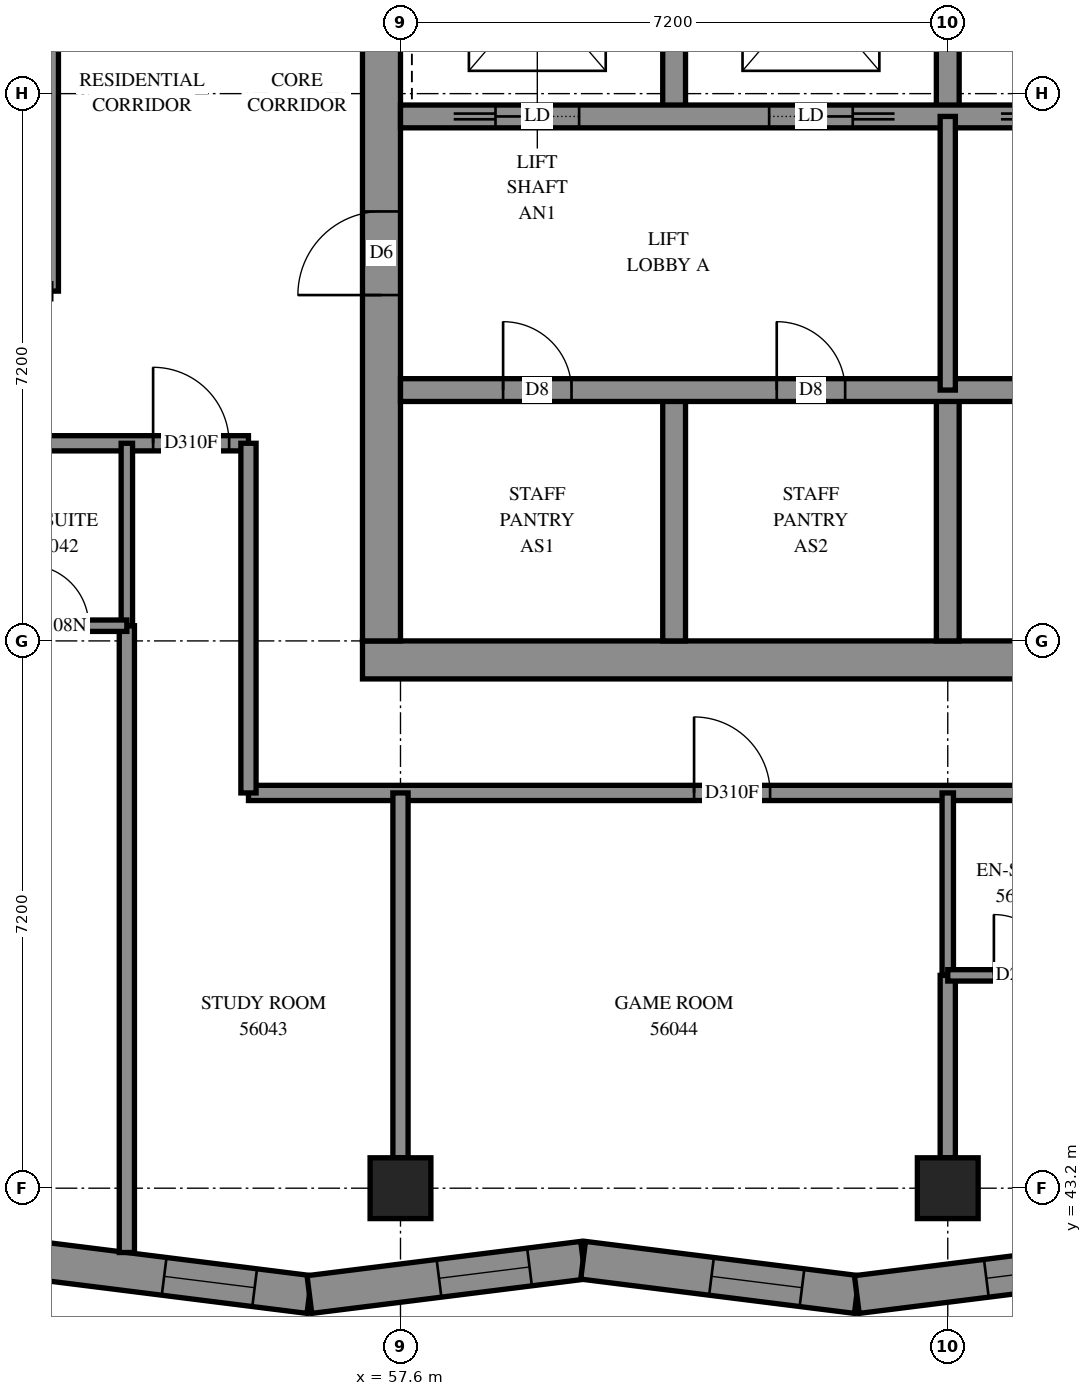
"""IFC4 building model, lengths in metres.
Left out: names, types, materials, properties, quantities, classifications, styles, units other than length and angle.
Written with IfcOpenShell. Run it as: python <this file> out.ifc"""

import sys

from ifc_helpers import new_model, si_unit, direction, frame, frame_2d, origin, origin_2d, place, context, subcontext, project, spatial, polyline, rectangle, outline, extrude, element, fill, save


model = new_model("IFC4")
c1 = context("Model", 3, precision=1e-05, world=origin(), true_north=direction((0.0, 1.0)))
c2 = subcontext(c1, "Body", "Model", "MODEL_VIEW")
j1 = project(units=[si_unit("LENGTHUNIT", "METRE"), si_unit("PLANEANGLEUNIT", "RADIAN")], contexts=[c1])
p1 = place(None, origin())
s1 = spatial("IfcSite", under=j1, at=p1, CompositionType="ELEMENT")
p2 = place(p1, origin())
s2 = spatial("IfcBuilding", under=s1, at=p2, CompositionType="ELEMENT")
p3 = place(p2, frame((0.0, 0.0, 206.6)))
s3 = spatial("IfcBuildingStorey", under=s2, at=p3, CompositionType="ELEMENT", Elevation=206.6)
for number, where, z_axis, x_axis in (
    (1, (57.6, 43.2, 0.0), (0.0, 0.0, 1.0), (1.0, 0.0, 0.0)),
    (2, (64.8, 43.2, 0.0), (0.0, 0.0, 1.0), (1.0, 0.0, 0.0)),
):
    element("IfcColumn", number, at=place(p3, frame(where, z_axis=z_axis, x_axis=x_axis)), inside=s3, PredefinedType="COLUMN", context=c2, shape_type="SweptSolid", body=[
        extrude(rectangle(XDim=0.8, YDim=0.8, at=origin_2d()), origin(), (0.0, 0.0, 1.0), 3.1),
    ])
p4 = place(p3, frame((57.1, 50.15, -0.3), z_axis=(0.0, 0.0, 1.0), x_axis=(1.0, 0.0, 0.0)))
e3 = element("IfcWall", 3, at=p4, inside=s3, PredefinedType="SHEAR", context=c2, shape_type="SweptSolid", body=[
    extrude(rectangle(XDim=15.4, YDim=0.5, at=frame_2d((7.7, 0.0))), origin(), (0.0, 0.0, 1.0), 2.7),
])
p5 = place(p3, frame((57.35, 50.4, -0.3), z_axis=(0.0, 0.0, 1.0), x_axis=(0.0, 1.0, 0.0)))
e4 = element("IfcWall", 4, at=p5, inside=s3, PredefinedType="SHEAR", context=c2, shape_type="SweptSolid", body=[
    extrude(rectangle(XDim=14.4, YDim=0.5, at=frame_2d((7.2, 0.0))), origin(), (0.0, 0.0, 1.0), 2.7),
])
p6 = place(p5, frame((4.55, 0.0, 0.3)))
e5 = element("IfcOpeningElement", 5, at=p6, cuts=e4, PredefinedType="OPENING", context=c2, shape_type="SweptSolid", body=[
    extrude(rectangle(XDim=1.1, YDim=2.1, at=frame_2d((0.55, 1.05))), frame((0.0, 0.26, 0.0), z_axis=(0.0, -1.0, 0.0), x_axis=(1.0, 0.0, 0.0)), (0.0, 0.0, 1.0), 0.52),
])
p7 = place(p5, frame((11.35, 0.0, 0.3)))
e6 = element("IfcOpeningElement", 6, at=p7, cuts=e4, PredefinedType="OPENING", context=c2, shape_type="SweptSolid", body=[
    extrude(rectangle(XDim=1.1, YDim=2.1, at=frame_2d((0.55, 1.05))), frame((0.0, 0.26, 0.0), z_axis=(0.0, -1.0, 0.0), x_axis=(1.0, 0.0, 0.0)), (0.0, 0.0, 1.0), 0.52),
])
for number, where, z_axis, x_axis in (
    (7, (61.2, 50.4, 0.0), (0.0, 0.0, 1.0), (0.0, 1.0, 0.0)),
    (8, (61.2, 57.3, 0.0), (0.0, 0.0, 1.0), (0.0, 1.0, 0.0)),
    (9, (64.8, 50.4, 0.0), (0.0, 0.0, 1.0), (0.0, 1.0, 0.0)),
    (10, (64.8, 57.3, 0.0), (0.0, 0.0, 1.0), (0.0, 1.0, 0.0)),
):
    element("IfcWall", number, at=place(p3, frame(where, z_axis=z_axis, x_axis=x_axis)), inside=s3, PredefinedType="SOLIDWALL", context=c2, shape_type="SweptSolid", body=[
        extrude(rectangle(XDim=3.3, YDim=0.3, at=frame_2d((1.65, 0.0))), origin(), (0.0, 0.0, 1.0), 3.1),
    ])
p8 = place(p3, frame((57.6, 53.7, 0.0), z_axis=(0.0, 0.0, 1.0), x_axis=(1.0, 0.0, 0.0)))
e11 = element("IfcWall", 11, at=p8, inside=s3, PredefinedType="SOLIDWALL", context=c2, shape_type="SweptSolid", body=[
    extrude(rectangle(XDim=14.4, YDim=0.3, at=frame_2d((7.2, 0.0))), origin(), (0.0, 0.0, 1.0), 3.1),
])
p9 = place(p8, frame((1.35, 0.0, 0.0)))
e12 = element("IfcOpeningElement", 12, at=p9, cuts=e11, PredefinedType="OPENING", context=c2, shape_type="SweptSolid", body=[
    extrude(rectangle(XDim=0.9, YDim=2.1, at=frame_2d((0.45, 1.05))), frame((0.0, 0.16, 0.0), z_axis=(0.0, -1.0, 0.0), x_axis=(1.0, 0.0, 0.0)), (0.0, 0.0, 1.0), 0.32),
])
p10 = place(p8, frame((4.95, 0.0, 0.0)))
e13 = element("IfcOpeningElement", 13, at=p10, cuts=e11, PredefinedType="OPENING", context=c2, shape_type="SweptSolid", body=[
    extrude(rectangle(XDim=0.9, YDim=2.1, at=frame_2d((0.45, 1.05))), frame((0.0, 0.16, 0.0), z_axis=(0.0, -1.0, 0.0), x_axis=(1.0, 0.0, 0.0)), (0.0, 0.0, 1.0), 0.32),
])
p11 = place(p8, frame((8.55, 0.0, 0.0)))
e14 = element("IfcOpeningElement", 14, at=p11, cuts=e11, PredefinedType="OPENING", context=c2, shape_type="SweptSolid", body=[
    extrude(rectangle(XDim=0.9, YDim=2.1, at=frame_2d((0.45, 1.05))), frame((0.0, 0.16, 0.0), z_axis=(0.0, -1.0, 0.0), x_axis=(1.0, 0.0, 0.0)), (0.0, 0.0, 1.0), 0.32),
])
p12 = place(p8, frame((12.05, 0.0, 0.0)))
e15 = element("IfcOpeningElement", 15, at=p12, cuts=e11, PredefinedType="OPENING", context=c2, shape_type="SweptSolid", body=[
    extrude(rectangle(XDim=1.1, YDim=2.1, at=frame_2d((0.55, 1.05))), frame((0.0, 0.16, 0.0), z_axis=(0.0, -1.0, 0.0), x_axis=(1.0, 0.0, 0.0)), (0.0, 0.0, 1.0), 0.32),
])
p13 = place(p3, frame((57.6, 57.3, 0.0), z_axis=(0.0, 0.0, 1.0), x_axis=(1.0, 0.0, 0.0)))
e16 = element("IfcWall", 16, at=p13, inside=s3, PredefinedType="SOLIDWALL", context=c2, shape_type="SweptSolid", body=[
    extrude(rectangle(XDim=14.4, YDim=0.3, at=frame_2d((7.2, 0.0))), origin(), (0.0, 0.0, 1.0), 3.1),
])
p14 = place(p13, frame((1.25, 0.0, 0.0)))
e17 = element("IfcOpeningElement", 17, at=p14, cuts=e16, PredefinedType="OPENING", context=c2, shape_type="SweptSolid", body=[
    extrude(rectangle(XDim=1.1, YDim=2.1, at=frame_2d((0.55, 1.05))), frame((0.0, 0.16, 0.0), z_axis=(0.0, -1.0, 0.0), x_axis=(1.0, 0.0, 0.0)), (0.0, 0.0, 1.0), 0.32),
])
p15 = place(p13, frame((4.85, 0.0, 0.0)))
e18 = element("IfcOpeningElement", 18, at=p15, cuts=e16, PredefinedType="OPENING", context=c2, shape_type="SweptSolid", body=[
    extrude(rectangle(XDim=1.1, YDim=2.1, at=frame_2d((0.55, 1.05))), frame((0.0, 0.16, 0.0), z_axis=(0.0, -1.0, 0.0), x_axis=(1.0, 0.0, 0.0)), (0.0, 0.0, 1.0), 0.32),
])
p16 = place(p13, frame((8.45, 0.0, 0.0)))
e19 = element("IfcOpeningElement", 19, at=p16, cuts=e16, PredefinedType="OPENING", context=c2, shape_type="SweptSolid", body=[
    extrude(rectangle(XDim=1.1, YDim=2.1, at=frame_2d((0.55, 1.05))), frame((0.0, 0.16, 0.0), z_axis=(0.0, -1.0, 0.0), x_axis=(1.0, 0.0, 0.0)), (0.0, 0.0, 1.0), 0.32),
])
p17 = place(p13, frame((12.05, 0.0, 0.0)))
e20 = element("IfcOpeningElement", 20, at=p17, cuts=e16, PredefinedType="OPENING", context=c2, shape_type="SweptSolid", body=[
    extrude(rectangle(XDim=1.1, YDim=2.1, at=frame_2d((0.55, 1.05))), frame((0.0, 0.16, 0.0), z_axis=(0.0, -1.0, 0.0), x_axis=(1.0, 0.0, 0.0)), (0.0, 0.0, 1.0), 0.32),
])
p18 = place(p3, frame((52.781, 42.255, 0.0), z_axis=(0.0, 0.0, 1.0), x_axis=(0.9922491844, -0.1242640575, 0.0)))
e21 = element("IfcWall", 21, at=p18, inside=s3, PredefinedType="SOLIDWALL", context=c2, shape_type="SweptSolid", body=[
    extrude(outline(polyline([(0.052, -0.25), (3.681, -0.25), (3.618, 0.25), (-0.052, 0.25), (0.052, -0.25)])), origin(), (0.0, 0.0, 1.0), 3.1),
])
p19 = place(p18, frame((1.724, 0.0, 0.45)))
e22 = element("IfcOpeningElement", 22, at=p19, cuts=e21, PredefinedType="OPENING", context=c2, shape_type="SweptSolid", body=[
    extrude(rectangle(XDim=1.2, YDim=2.5, at=frame_2d((0.6, 1.25))), frame((0.0, 0.26, 0.0), z_axis=(0.0, -1.0, 0.0), x_axis=(1.0, 0.0, 0.0)), (0.0, 0.0, 1.0), 0.52),
])
p20 = place(p3, frame((56.402, 41.801, 0.0), z_axis=(0.0, 0.0, 1.0), x_axis=(0.9922477484, 0.124275524, 0.0)))
e23 = element("IfcWall", 23, at=p20, inside=s3, PredefinedType="SOLIDWALL", context=c2, shape_type="SweptSolid", body=[
    extrude(outline(polyline([(-0.031, -0.25), (3.598, -0.25), (3.66, 0.25), (0.031, 0.25), (-0.031, -0.25)])), origin(), (0.0, 0.0, 1.0), 3.1),
])
p21 = place(p20, frame((1.718, 0.0, 0.45)))
e24 = element("IfcOpeningElement", 24, at=p21, cuts=e23, PredefinedType="OPENING", context=c2, shape_type="SweptSolid", body=[
    extrude(rectangle(XDim=1.2, YDim=2.5, at=frame_2d((0.6, 1.25))), frame((0.0, 0.26, 0.0), z_axis=(0.0, -1.0, 0.0), x_axis=(1.0, 0.0, 0.0)), (0.0, 0.0, 1.0), 0.52),
])
p22 = place(p3, frame((60.003, 42.252, 0.0), z_axis=(0.0, 0.0, 1.0), x_axis=(0.9922477484, -0.124275524, 0.0)))
e25 = element("IfcWall", 25, at=p22, inside=s3, PredefinedType="SOLIDWALL", context=c2, shape_type="SweptSolid", body=[
    extrude(outline(polyline([(0.031, -0.25), (3.66, -0.25), (3.598, 0.25), (-0.031, 0.25), (0.031, -0.25)])), origin(), (0.0, 0.0, 1.0), 3.1),
])
p23 = place(p22, frame((1.702, 0.0, 0.45)))
e26 = element("IfcOpeningElement", 26, at=p23, cuts=e25, PredefinedType="OPENING", context=c2, shape_type="SweptSolid", body=[
    extrude(rectangle(XDim=1.2, YDim=2.5, at=frame_2d((0.6, 1.25))), frame((0.0, 0.26, 0.0), z_axis=(0.0, -1.0, 0.0), x_axis=(1.0, 0.0, 0.0)), (0.0, 0.0, 1.0), 0.52),
])
p24 = place(p3, frame((63.603, 41.801, 0.0), z_axis=(0.0, 0.0, 1.0), x_axis=(0.9922473228, 0.1242789221, 0.0)))
e27 = element("IfcWall", 27, at=p24, inside=s3, PredefinedType="SOLIDWALL", context=c2, shape_type="SweptSolid", body=[
    extrude(outline(polyline([(-0.031, -0.25), (3.598, -0.25), (3.66, 0.25), (0.031, 0.25), (-0.031, -0.25)])), origin(), (0.0, 0.0, 1.0), 3.1),
])
p25 = place(p24, frame((1.717, 0.0, 0.45)))
e28 = element("IfcOpeningElement", 28, at=p25, cuts=e27, PredefinedType="OPENING", context=c2, shape_type="SweptSolid", body=[
    extrude(rectangle(XDim=1.2, YDim=2.5, at=frame_2d((0.6, 1.25))), frame((0.0, 0.26, 0.0), z_axis=(0.0, -1.0, 0.0), x_axis=(1.0, 0.0, 0.0)), (0.0, 0.0, 1.0), 0.52),
])
p26 = place(p3, frame((64.8, 53.7, 0.0), z_axis=(0.0, 0.0, 1.0), x_axis=(0.0, 1.0, 0.0)))
e29 = element("IfcWall", 29, at=p26, inside=s3, PredefinedType="PARTITIONING", context=c2, shape_type="SweptSolid", body=[
    extrude(rectangle(XDim=3.6, YDim=0.2, at=frame_2d((1.8, 0.0))), origin(), (0.0, 0.0, 1.0), 3.1),
])
p27 = place(p3, frame((55.6, 48.4, 0.0), z_axis=(0.0, 0.0, 1.0), x_axis=(1.0, 0.0, 0.0)))
e30 = element("IfcWall", 30, at=p27, inside=s3, PredefinedType="PARTITIONING", context=c2, shape_type="SweptSolid", body=[
    extrude(rectangle(XDim=18.4, YDim=0.2, at=frame_2d((9.2, 0.0))), origin(), (0.0, 0.0, 1.0), 3.1),
])
p28 = place(p27, frame((5.862, 0.0, 0.0)))
e31 = element("IfcOpeningElement", 31, at=p28, cuts=e30, PredefinedType="OPENING", context=c2, shape_type="SweptSolid", body=[
    extrude(rectangle(XDim=1.0, YDim=2.1, at=frame_2d((0.5, 1.05))), frame((0.0, 0.11, 0.0), z_axis=(0.0, -1.0, 0.0), x_axis=(1.0, 0.0, 0.0)), (0.0, 0.0, 1.0), 0.22),
])
p29 = place(p27, frame((13.099, 0.0, 0.0)))
e32 = element("IfcOpeningElement", 32, at=p29, cuts=e30, PredefinedType="OPENING", context=c2, shape_type="SweptSolid", body=[
    extrude(rectangle(XDim=0.9, YDim=2.1, at=frame_2d((0.45, 1.05))), frame((0.0, 0.11, 0.0), z_axis=(0.0, -1.0, 0.0), x_axis=(1.0, 0.0, 0.0)), (0.0, 0.0, 1.0), 0.22),
])
p30 = place(p3, frame((54.0, 42.354, 0.0), z_axis=(0.0, 0.0, 1.0), x_axis=(0.0, 1.0, 0.0)))
e33 = element("IfcWall", 33, at=p30, inside=s3, PredefinedType="PARTITIONING", context=c2, shape_type="SweptSolid", body=[
    extrude(rectangle(XDim=8.246, YDim=0.2, at=frame_2d((4.123, 0.0))), origin(), (0.0, 0.0, 1.0), 3.1),
])
p31 = place(p3, frame((50.4, 53.0, 0.0), z_axis=(0.0, 0.0, 1.0), x_axis=(1.0, 0.0, 0.0)))
e34 = element("IfcWall", 34, at=p31, inside=s3, PredefinedType="PARTITIONING", context=c2, shape_type="SweptSolid", body=[
    extrude(rectangle(XDim=5.2, YDim=0.2, at=frame_2d((2.6, 0.0))), origin(), (0.0, 0.0, 1.0), 3.1),
])
p32 = place(p31, frame((0.4, 0.0, 0.0)))
e35 = element("IfcOpeningElement", 35, at=p32, cuts=e34, PredefinedType="OPENING", context=c2, shape_type="SweptSolid", body=[
    extrude(rectangle(XDim=0.9, YDim=2.1, at=frame_2d((0.45, 1.05))), frame((0.0, 0.11, 0.0), z_axis=(0.0, -1.0, 0.0), x_axis=(1.0, 0.0, 0.0)), (0.0, 0.0, 1.0), 0.22),
])
p33 = place(p31, frame((3.946, 0.0, 0.0)))
e36 = element("IfcOpeningElement", 36, at=p33, cuts=e34, PredefinedType="OPENING", context=c2, shape_type="SweptSolid", body=[
    extrude(rectangle(XDim=1.0, YDim=2.1, at=frame_2d((0.5, 1.05))), frame((0.0, 0.11, 0.0), z_axis=(0.0, -1.0, 0.0), x_axis=(1.0, 0.0, 0.0)), (0.0, 0.0, 1.0), 0.22),
])
p34 = place(p3, frame((53.0, 55.002, 0.0), z_axis=(0.0, 0.0, 1.0), x_axis=(0.0, 1.0, 0.0)))
e37 = element("IfcWall", 37, at=p34, inside=s3, PredefinedType="PARTITIONING", context=c2, shape_type="SweptSolid", body=[
    extrude(rectangle(XDim=5.198, YDim=0.2, at=frame_2d((2.599, 0.0))), origin(), (0.0, 0.0, 1.0), 3.1),
])
p35 = place(p3, frame((57.6, 43.6, 0.0), z_axis=(0.0, 0.0, 1.0), x_axis=(0.0, 1.0, 0.0)))
e38 = element("IfcWall", 38, at=p35, inside=s3, PredefinedType="PARTITIONING", context=c2, shape_type="SweptSolid", body=[
    extrude(rectangle(XDim=4.8, YDim=0.2, at=frame_2d((2.4, 0.0))), origin(), (0.0, 0.0, 1.0), 3.1),
])
p36 = place(p3, frame((55.6, 48.4, 0.0), z_axis=(0.0, 0.0, 1.0), x_axis=(0.0, 1.0, 0.0)))
e39 = element("IfcWall", 39, at=p36, inside=s3, PredefinedType="PARTITIONING", context=c2, shape_type="SweptSolid", body=[
    extrude(rectangle(XDim=4.6, YDim=0.2, at=frame_2d((2.3, 0.0))), origin(), (0.0, 0.0, 1.0), 3.1),
])
p37 = place(p3, frame((54.0, 50.6, 0.0), z_axis=(0.0, 0.0, 1.0), x_axis=(0.0, 1.0, 0.0)))
e40 = element("IfcWall", 40, at=p37, inside=s3, PredefinedType="PARTITIONING", context=c2, shape_type="SweptSolid", body=[
    extrude(rectangle(XDim=2.4, YDim=0.15, at=frame_2d((1.2, 0.0))), origin(), (0.0, 0.0, 1.0), 3.1),
])
p38 = place(p3, frame((64.8, 43.6, 0.0), z_axis=(0.0, 0.0, 1.0), x_axis=(0.0, 1.0, 0.0)))
e41 = element("IfcWall", 41, at=p38, inside=s3, PredefinedType="PARTITIONING", context=c2, shape_type="SweptSolid", body=[
    extrude(rectangle(XDim=2.4, YDim=0.2, at=frame_2d((1.2, 0.0))), origin(), (0.0, 0.0, 1.0), 3.1),
])
p39 = place(p3, frame((64.8, 46.0, 0.0), z_axis=(0.0, 0.0, 1.0), x_axis=(0.0, 1.0, 0.0)))
e42 = element("IfcWall", 42, at=p39, inside=s3, PredefinedType="PARTITIONING", context=c2, shape_type="SweptSolid", body=[
    extrude(rectangle(XDim=2.4, YDim=0.15, at=frame_2d((1.2, 0.0))), origin(), (0.0, 0.0, 1.0), 3.1),
])
p40 = place(p3, frame((64.8, 46.0, 0.0), z_axis=(0.0, 0.0, 1.0), x_axis=(1.0, 0.0, 0.0)))
e43 = element("IfcWall", 43, at=p40, inside=s3, PredefinedType="PARTITIONING", context=c2, shape_type="SweptSolid", body=[
    extrude(rectangle(XDim=1.9, YDim=0.15, at=frame_2d((0.95, 0.0))), origin(), (0.0, 0.0, 1.0), 3.1),
])
p41 = place(p40, frame((0.607, 0.0, 0.0)))
e44 = element("IfcOpeningElement", 44, at=p41, cuts=e43, PredefinedType="OPENING", context=c2, shape_type="SweptSolid", body=[
    extrude(rectangle(XDim=0.8, YDim=2.1, at=frame_2d((0.4, 1.05))), frame((0.0, 0.085, 0.0), z_axis=(0.0, -1.0, 0.0), x_axis=(1.0, 0.0, 0.0)), (0.0, 0.0, 1.0), 0.17),
])
p42 = place(p3, frame((52.1, 50.6, 0.0), z_axis=(0.0, 0.0, 1.0), x_axis=(1.0, 0.0, 0.0)))
e45 = element("IfcWall", 45, at=p42, inside=s3, PredefinedType="PARTITIONING", context=c2, shape_type="SweptSolid", body=[
    extrude(rectangle(XDim=1.9, YDim=0.15, at=frame_2d((0.95, 0.0))), origin(), (0.0, 0.0, 1.0), 3.1),
])
p43 = place(p42, frame((0.598, 0.0, 0.0)))
e46 = element("IfcOpeningElement", 46, at=p43, cuts=e45, PredefinedType="OPENING", context=c2, shape_type="SweptSolid", body=[
    extrude(rectangle(XDim=0.8, YDim=2.1, at=frame_2d((0.4, 1.05))), frame((0.0, 0.085, 0.0), z_axis=(0.0, -1.0, 0.0), x_axis=(1.0, 0.0, 0.0)), (0.0, 0.0, 1.0), 0.17),
])
p44 = place(p19, origin())
e47 = element("IfcWindow", 47, at=p44, inside=s3, PartitioningType="SINGLE_PANEL", PredefinedType="WINDOW", context=c2, shape_type="SweptSolid", body=[
    extrude(rectangle(XDim=1.2, YDim=2.5, at=frame_2d((0.6, 1.25))), frame((0.0, 0.18, 0.0), z_axis=(0.0, -1.0, 0.0), x_axis=(1.0, 0.0, 0.0)), (0.0, 0.0, 1.0), 0.06),
])
fill(e22, e47)
p45 = place(p21, origin())
e48 = element("IfcWindow", 48, at=p45, inside=s3, PartitioningType="SINGLE_PANEL", PredefinedType="WINDOW", context=c2, shape_type="SweptSolid", body=[
    extrude(rectangle(XDim=1.2, YDim=2.5, at=frame_2d((0.6, 1.25))), frame((0.0, 0.18, 0.0), z_axis=(0.0, -1.0, 0.0), x_axis=(1.0, 0.0, 0.0)), (0.0, 0.0, 1.0), 0.06),
])
fill(e24, e48)
p46 = place(p23, origin())
e49 = element("IfcWindow", 49, at=p46, inside=s3, PartitioningType="SINGLE_PANEL", PredefinedType="WINDOW", context=c2, shape_type="SweptSolid", body=[
    extrude(rectangle(XDim=1.2, YDim=2.5, at=frame_2d((0.6, 1.25))), frame((0.0, 0.18, 0.0), z_axis=(0.0, -1.0, 0.0), x_axis=(1.0, 0.0, 0.0)), (0.0, 0.0, 1.0), 0.06),
])
fill(e26, e49)
p47 = place(p25, origin())
e50 = element("IfcWindow", 50, at=p47, inside=s3, PartitioningType="SINGLE_PANEL", PredefinedType="WINDOW", context=c2, shape_type="SweptSolid", body=[
    extrude(rectangle(XDim=1.2, YDim=2.5, at=frame_2d((0.6, 1.25))), frame((0.0, 0.18, 0.0), z_axis=(0.0, -1.0, 0.0), x_axis=(1.0, 0.0, 0.0)), (0.0, 0.0, 1.0), 0.06),
])
fill(e28, e50)
p48 = place(p6, origin())
e51 = element("IfcDoor", 51, at=p48, inside=s3, OperationType="DOUBLE_DOOR_SINGLE_SWING", PredefinedType="DOOR", context=c2, shape_type="SweptSolid", body=[
    extrude(rectangle(XDim=1.1, YDim=2.1, at=frame_2d((0.55, 1.05))), frame((0.0, 0.025, 0.0), z_axis=(0.0, -1.0, 0.0), x_axis=(1.0, 0.0, 0.0)), (0.0, 0.0, 1.0), 0.05),
])
fill(e5, e51)
p49 = place(p9, origin())
e52 = element("IfcDoor", 52, at=p49, inside=s3, OperationType="SINGLE_SWING_LEFT", PredefinedType="DOOR", context=c2, shape_type="SweptSolid", body=[
    extrude(rectangle(XDim=0.9, YDim=2.1, at=frame_2d((0.45, 1.05))), frame((0.0, 0.025, 0.0), z_axis=(0.0, -1.0, 0.0), x_axis=(1.0, 0.0, 0.0)), (0.0, 0.0, 1.0), 0.05),
])
fill(e12, e52)
p50 = place(p10, origin())
e53 = element("IfcDoor", 53, at=p50, inside=s3, OperationType="SINGLE_SWING_LEFT", PredefinedType="DOOR", context=c2, shape_type="SweptSolid", body=[
    extrude(rectangle(XDim=0.9, YDim=2.1, at=frame_2d((0.45, 1.05))), frame((0.0, 0.025, 0.0), z_axis=(0.0, -1.0, 0.0), x_axis=(1.0, 0.0, 0.0)), (0.0, 0.0, 1.0), 0.05),
])
fill(e13, e53)
p51 = place(p14, origin())
e54 = element("IfcDoor", 54, at=p51, inside=s3, OperationType="SLIDING_TO_LEFT", PredefinedType="DOOR", context=c2, shape_type="SweptSolid", body=[
    extrude(rectangle(XDim=1.1, YDim=2.1, at=frame_2d((0.55, 1.05))), frame((0.0, 0.025, 0.0), z_axis=(0.0, -1.0, 0.0), x_axis=(1.0, 0.0, 0.0)), (0.0, 0.0, 1.0), 0.05),
])
fill(e17, e54)
p52 = place(p15, origin())
e55 = element("IfcDoor", 55, at=p52, inside=s3, OperationType="SLIDING_TO_RIGHT", PredefinedType="DOOR", context=c2, shape_type="SweptSolid", body=[
    extrude(rectangle(XDim=1.1, YDim=2.1, at=frame_2d((0.55, 1.05))), frame((0.0, 0.025, 0.0), z_axis=(0.0, -1.0, 0.0), x_axis=(1.0, 0.0, 0.0)), (0.0, 0.0, 1.0), 0.05),
])
fill(e18, e55)
p53 = place(p43, origin())
e56 = element("IfcDoor", 56, at=p53, inside=s3, OperationType="SINGLE_SWING_RIGHT", PredefinedType="DOOR", context=c2, shape_type="SweptSolid", body=[
    extrude(rectangle(XDim=0.8, YDim=2.1, at=frame_2d((0.4, 1.05))), frame((0.0, 0.025, 0.0), z_axis=(0.0, -1.0, 0.0), x_axis=(1.0, 0.0, 0.0)), (0.0, 0.0, 1.0), 0.05),
])
fill(e46, e56)
p54 = place(p33, origin())
e57 = element("IfcDoor", 57, at=p54, inside=s3, OperationType="SINGLE_SWING_RIGHT", PredefinedType="DOOR", context=c2, shape_type="SweptSolid", body=[
    extrude(rectangle(XDim=1.0, YDim=2.1, at=frame_2d((0.5, 1.05))), frame((0.0, 0.025, 0.0), z_axis=(0.0, -1.0, 0.0), x_axis=(1.0, 0.0, 0.0)), (0.0, 0.0, 1.0), 0.05),
])
fill(e36, e57)
p55 = place(p28, origin())
e58 = element("IfcDoor", 58, at=p55, inside=s3, OperationType="SINGLE_SWING_LEFT", PredefinedType="DOOR", context=c2, shape_type="SweptSolid", body=[
    extrude(rectangle(XDim=1.0, YDim=2.1, at=frame_2d((0.5, 1.05))), frame((0.0, 0.025, 0.0), z_axis=(0.0, -1.0, 0.0), x_axis=(1.0, 0.0, 0.0)), (0.0, 0.0, 1.0), 0.05),
])
fill(e31, e58)
p56 = place(p41, origin())
e59 = element("IfcDoor", 59, at=p56, inside=s3, OperationType="SINGLE_SWING_RIGHT", PredefinedType="DOOR", context=c2, shape_type="SweptSolid", body=[
    extrude(rectangle(XDim=0.8, YDim=2.1, at=frame_2d((0.4, 1.05))), frame((0.0, 0.025, 0.0), z_axis=(0.0, -1.0, 0.0), x_axis=(1.0, 0.0, 0.0)), (0.0, 0.0, 1.0), 0.05),
])
fill(e44, e59)
save(model, sys.argv[1])
